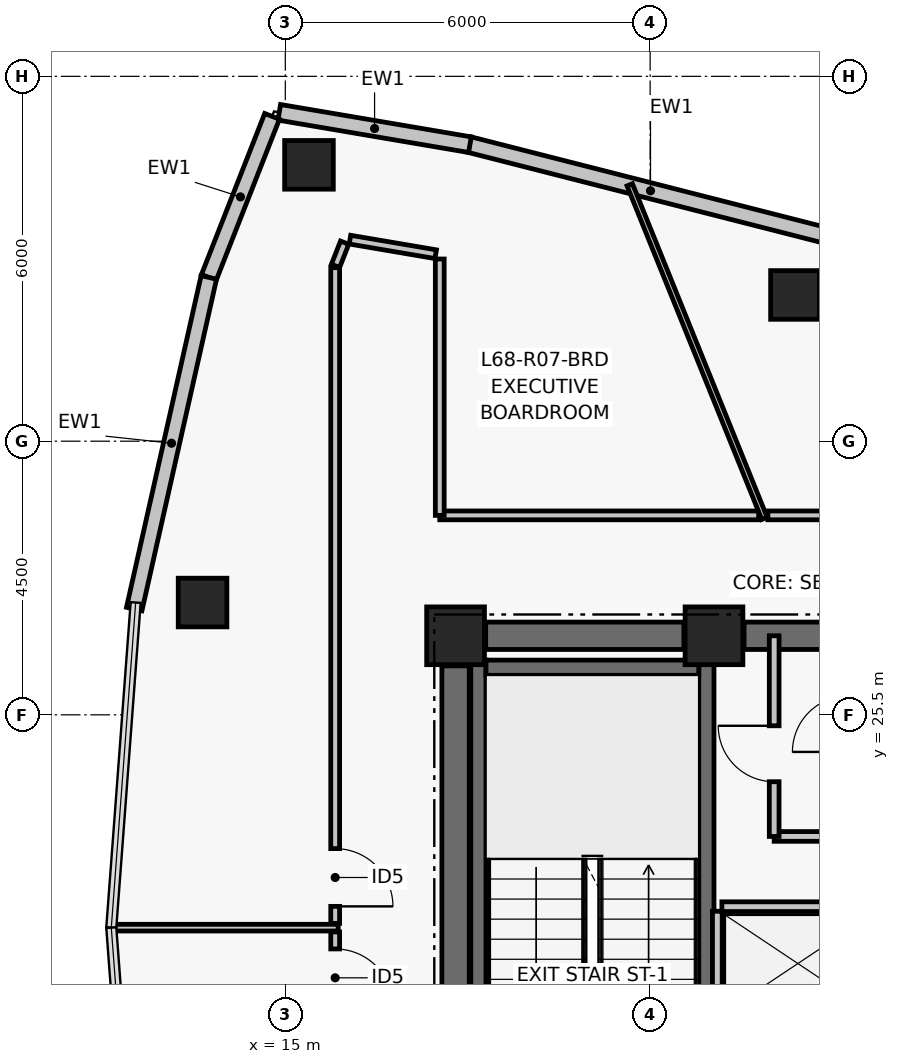
"""IFC4 building model, lengths in metres.
Left out: names, types, materials, properties, quantities, classifications, styles, units other than length and angle.
Written with IfcOpenShell. Run it as: python <this file> out.ifc"""

import sys

from ifc_helpers import new_model, si_unit, direction, frame, frame_2d, origin, origin_2d, place, context, subcontext, project, spatial, rectangle, hollow_rectangle, extrude, element, fill, save


model = new_model("IFC4")
c1 = context("Model", 3, precision=1e-05, world=origin(), true_north=direction((0.0, 1.0)))
c2 = subcontext(c1, "Body", "Model", "MODEL_VIEW")
j1 = project(units=[si_unit("LENGTHUNIT", "METRE"), si_unit("PLANEANGLEUNIT", "RADIAN")], contexts=[c1])
p1 = place(None, origin())
s1 = spatial("IfcSite", under=j1, at=p1, CompositionType="ELEMENT")
p2 = place(p1, origin())
s2 = spatial("IfcBuilding", under=s1, at=p2, CompositionType="ELEMENT")
p3 = place(p2, frame((0.0, 0.0, 269.46)))
s3 = spatial("IfcBuildingStorey", under=s2, at=p3, CompositionType="ELEMENT", Elevation=269.46)
for number, where, z_axis, x_axis in (
    (1, (17.8, 26.8, 0.0), (0.0, 0.0, 1.0), (1.0, 0.0, 0.0)),
    (2, (22.05, 26.8, 0.0), (0.0, 0.0, 1.0), (1.0, 0.0, 0.0)),
):
    element("IfcColumn", number, at=place(p3, frame(where, z_axis=z_axis, x_axis=x_axis)), inside=s3, PredefinedType="COLUMN", context=c2, shape_type="SweptSolid", body=[
        extrude(rectangle(XDim=0.95, YDim=0.95, at=origin_2d()), origin(), (0.0, 0.0, 1.0), 3.72),
    ])
p4 = place(p3, frame((18.295, 26.8, 0.0), z_axis=(0.0, 0.0, 1.0), x_axis=(1.0, 0.0, 0.0)))
e3 = element("IfcWall", 3, at=p4, inside=s3, PredefinedType="SHEAR", context=c2, shape_type="SweptSolid", body=[
    extrude(rectangle(XDim=3.26, YDim=0.45, at=frame_2d((1.63, 0.0))), origin(), (0.0, 0.0, 1.0), 3.5),
])
p5 = place(p3, frame((22.545, 26.8, 0.0), z_axis=(0.0, 0.0, 1.0), x_axis=(1.0, 0.0, 0.0)))
e4 = element("IfcWall", 4, at=p5, inside=s3, PredefinedType="SHEAR", context=c2, shape_type="SweptSolid", body=[
    extrude(rectangle(XDim=1.805, YDim=0.45, at=frame_2d((0.903, 0.0))), origin(), (0.0, 0.0, 1.0), 3.5),
])
p6 = place(p3, frame((17.8, 17.695, 0.0), z_axis=(0.0, 0.0, 1.0), x_axis=(0.0, 1.0, 0.0)))
e5 = element("IfcWall", 5, at=p6, inside=s3, PredefinedType="SHEAR", context=c2, shape_type="SweptSolid", body=[
    extrude(rectangle(XDim=8.61, YDim=0.45, at=frame_2d((4.305, 0.0))), origin(), (0.0, 0.0, 1.0), 3.5),
])
p7 = place(p3, frame((18.175, 17.6, 0.0), z_axis=(0.0, 0.0, 1.0), x_axis=(0.0, 1.0, 0.0)))
e6 = element("IfcWall", 6, at=p7, inside=s3, PredefinedType="SHEAR", context=c2, shape_type="SweptSolid", body=[
    extrude(rectangle(XDim=8.8, YDim=0.25, at=frame_2d((4.4, 0.0))), origin(), (0.0, 0.0, 1.0), 3.5),
])
p8 = place(p3, frame((21.925, 17.6, 0.0), z_axis=(0.0, 0.0, 1.0), x_axis=(0.0, 1.0, 0.0)))
e7 = element("IfcWall", 7, at=p8, inside=s3, PredefinedType="SHEAR", context=c2, shape_type="SweptSolid", body=[
    extrude(rectangle(XDim=8.8, YDim=0.25, at=frame_2d((4.4, 0.0))), origin(), (0.0, 0.0, 1.0), 3.5),
])
p9 = place(p8, frame((0.35, 0.0, 0.0)))
e8 = element("IfcOpeningElement", 8, at=p9, cuts=e7, PredefinedType="OPENING", context=c2, shape_type="SweptSolid", body=[
    extrude(rectangle(XDim=1.05, YDim=2.08, at=frame_2d((0.525, 1.04))), frame((0.0, 0.135, 0.0), z_axis=(0.0, -1.0, 0.0), x_axis=(1.0, 0.0, 0.0)), (0.0, 0.0, 1.0), 0.27),
])
p10 = place(p3, frame((18.3, 26.275, 0.0), z_axis=(0.0, 0.0, 1.0), x_axis=(1.0, 0.0, 0.0)))
e9 = element("IfcWall", 9, at=p10, inside=s3, PredefinedType="SHEAR", context=c2, shape_type="SweptSolid", body=[
    extrude(rectangle(XDim=3.5, YDim=0.25, at=frame_2d((1.75, 0.0))), origin(), (0.0, 0.0, 1.0), 3.5),
])
for number, where, z_axis, x_axis in (
    (10, (23.382, 32.405, 0.0), (0.0, 0.0, 1.0), (1.0, 0.0, 0.0)),
    (11, (15.389, 34.545, 0.0), (0.0, 0.0, 1.0), (1.0, 0.0, 0.0)),
    (12, (13.639, 27.347, 0.0), (0.0, 0.0, 1.0), (1.0, 0.0, 0.0)),
):
    element("IfcColumn", number, at=place(p3, frame(where, z_axis=z_axis, x_axis=x_axis)), inside=s3, PredefinedType="COLUMN", context=c2, shape_type="SweptSolid", body=[
        extrude(hollow_rectangle(XDim=0.8, YDim=0.8, WallThickness=0.035, at=origin_2d()), origin(), (0.0, 0.0, 1.0), 3.72),
    ])
p11 = place(p3, frame((18.024, 34.879, 0.0), z_axis=(0.0, 0.0, 1.0), x_axis=(0.968988278672, -0.247106689096, 0.0)))
e13 = element("IfcWall", 13, at=p11, inside=s3, PredefinedType="PARTITIONING", context=c2, shape_type="SweptSolid", body=[
    extrude(rectangle(XDim=6.154, YDim=0.26, at=frame_2d((3.077, 0.0))), origin(), (0.0, 0.0, 1.0), 3.5),
])
p12 = place(p3, frame((14.9, 35.409, 0.0), z_axis=(0.0, 0.0, 1.0), x_axis=(0.985889432766, -0.167397808709, 0.0)))
e14 = element("IfcWall", 14, at=p12, inside=s3, PredefinedType="PARTITIONING", context=c2, shape_type="SweptSolid", body=[
    extrude(rectangle(XDim=3.181, YDim=0.26, at=frame_2d((1.59, 0.0))), origin(), (0.0, 0.0, 1.0), 3.5),
])
p13 = place(p3, frame((13.742, 32.693, 0.0), z_axis=(0.0, 0.0, 1.0), x_axis=(0.36559927932, 0.930772349697, 0.0)))
e15 = element("IfcWall", 15, at=p13, inside=s3, PredefinedType="PARTITIONING", context=c2, shape_type="SweptSolid", body=[
    extrude(rectangle(XDim=2.845, YDim=0.26, at=frame_2d((1.423, 0.0))), origin(), (0.0, 0.0, 1.0), 3.5),
])
p14 = place(p3, frame((12.515, 27.24, 0.0), z_axis=(0.0, 0.0, 1.0), x_axis=(0.219500763731, 0.97561232809, 0.0)))
e16 = element("IfcWall", 16, at=p14, inside=s3, PredefinedType="PARTITIONING", context=c2, shape_type="SweptSolid", body=[
    extrude(rectangle(XDim=5.59, YDim=0.26, at=frame_2d((2.795, 0.0))), origin(), (0.0, 0.0, 1.0), 3.5),
])
p15 = place(p3, frame((22.105, 20.56, 0.0), z_axis=(0.0, 0.0, 1.0), x_axis=(0.0, 1.0, 0.0)))
e17 = element("IfcWall", 17, at=p15, inside=s3, PredefinedType="PARTITIONING", context=c2, shape_type="SweptSolid", body=[
    extrude(rectangle(XDim=1.71, YDim=0.16, at=frame_2d((0.855, 0.0))), origin(), (0.0, 0.0, 1.0), 3.5),
])
p16 = place(p3, frame((22.18, 22.345, 0.0), z_axis=(0.0, 0.0, 1.0), x_axis=(1.0, 0.0, 0.0)))
e18 = element("IfcWall", 18, at=p16, inside=s3, PredefinedType="PARTITIONING", context=c2, shape_type="SweptSolid", body=[
    extrude(rectangle(XDim=2.65, YDim=0.16, at=frame_2d((1.325, 0.0))), origin(), (0.0, 0.0, 1.0), 3.5),
])
p17 = place(p3, frame((23.04, 23.5, 0.0), z_axis=(0.0, 0.0, 1.0), x_axis=(1.0, 0.0, 0.0)))
e19 = element("IfcWall", 19, at=p17, inside=s3, PredefinedType="PARTITIONING", context=c2, shape_type="SweptSolid", body=[
    extrude(rectangle(XDim=1.7, YDim=0.16, at=frame_2d((0.85, 0.0))), origin(), (0.0, 0.0, 1.0), 3.5),
])
p18 = place(p3, frame((23.04, 23.5, 0.0), z_axis=(0.0, 0.0, 1.0), x_axis=(0.0, 1.0, 0.0)))
e20 = element("IfcWall", 20, at=p18, inside=s3, PredefinedType="PARTITIONING", context=c2, shape_type="SweptSolid", body=[
    extrude(rectangle(XDim=3.3, YDim=0.16, at=frame_2d((1.65, 0.0))), origin(), (0.0, 0.0, 1.0), 2.63),
])
p19 = place(p18, frame((0.9, 0.0, 0.0)))
e21 = element("IfcOpeningElement", 21, at=p19, cuts=e20, PredefinedType="OPENING", context=c2, shape_type="SweptSolid", body=[
    extrude(rectangle(XDim=0.92, YDim=2.05, at=frame_2d((0.46, 1.025))), frame((0.0, 0.09, 0.0), z_axis=(0.0, -1.0, 0.0), x_axis=(1.0, 0.0, 0.0)), (0.0, 0.0, 1.0), 0.18),
])
p20 = place(p3, frame((15.82, 21.93, 0.0), z_axis=(0.0, 0.0, 1.0), x_axis=(0.0, -1.0, 0.0)))
e22 = element("IfcWall", 22, at=p20, inside=s3, PredefinedType="PARTITIONING", context=c2, shape_type="SweptSolid", body=[
    extrude(rectangle(XDim=6.951, YDim=0.145, at=frame_2d((3.475, 0.0))), origin(), (0.0, 0.0, 1.0), 2.78),
])
p21 = place(p20, frame((0.28, 0.0, 0.0)))
e23 = element("IfcOpeningElement", 23, at=p21, cuts=e22, PredefinedType="OPENING", context=c2, shape_type="SweptSolid", body=[
    extrude(rectangle(XDim=0.95, YDim=2.06, at=frame_2d((0.475, 1.03))), frame((0.0, 0.083, 0.0), z_axis=(0.0, -1.0, 0.0), x_axis=(1.0, 0.0, 0.0)), (0.0, 0.0, 1.0), 0.165),
])
p22 = place(p3, frame((28.5, 28.78, 0.0), z_axis=(0.0, 0.0, 1.0), x_axis=(-1.0, 0.0, 0.0)))
e24 = element("IfcWall", 24, at=p22, inside=s3, PredefinedType="PARTITIONING", context=c2, shape_type="SweptSolid", body=[
    extrude(rectangle(XDim=5.564, YDim=0.145, at=frame_2d((2.782, 0.0))), origin(), (0.0, 0.0, 1.0), 3.5),
])
p23 = place(p22, frame((2.322, 0.0, 0.0)))
e25 = element("IfcOpeningElement", 25, at=p23, cuts=e24, PredefinedType="OPENING", context=c2, shape_type="SweptSolid", body=[
    extrude(rectangle(XDim=0.92, YDim=2.05, at=frame_2d((0.46, 1.025))), frame((0.0, 0.083, 0.0), z_axis=(0.0, -1.0, 0.0), x_axis=(1.0, 0.0, 0.0)), (0.0, 0.0, 1.0), 0.165),
])
p24 = place(p3, frame((22.785, 28.78, 0.0), z_axis=(0.0, 0.0, 1.0), x_axis=(-1.0, 0.0, 0.0)))
e26 = element("IfcWall", 26, at=p24, inside=s3, PredefinedType="PARTITIONING", context=c2, shape_type="SweptSolid", body=[
    extrude(rectangle(XDim=5.245, YDim=0.145, at=frame_2d((2.623, 0.0))), origin(), (0.0, 0.0, 1.0), 2.78),
])
p25 = place(p3, frame((17.54, 28.78, 0.0), z_axis=(0.0, 0.0, 1.0), x_axis=(0.0, 1.0, 0.0)))
e27 = element("IfcWall", 27, at=p25, inside=s3, PredefinedType="PARTITIONING", context=c2, shape_type="SweptSolid", body=[
    extrude(rectangle(XDim=4.216, YDim=0.145, at=frame_2d((2.108, 0.0))), origin(), (0.0, 0.0, 1.0), 3.13),
])
p26 = place(p3, frame((17.473, 33.075, 0.0), z_axis=(0.0, 0.0, 1.0), x_axis=(-0.985881780308, 0.167442871621, 0.0)))
e28 = element("IfcWall", 28, at=p26, inside=s3, PredefinedType="PARTITIONING", context=c2, shape_type="SweptSolid", body=[
    extrude(rectangle(XDim=1.43, YDim=0.145, at=frame_2d((0.715, 0.0))), origin(), (0.0, 0.0, 1.0), 3.13),
])
p27 = place(p3, frame((15.975, 33.265, 0.0), z_axis=(0.0, 0.0, 1.0), x_axis=(-0.365633948196, -0.930758731319, 0.0)))
e29 = element("IfcWall", 29, at=p27, inside=s3, PredefinedType="PARTITIONING", context=c2, shape_type="SweptSolid", body=[
    extrude(rectangle(XDim=0.41, YDim=0.145, at=frame_2d((0.205, 0.0))), origin(), (0.0, 0.0, 1.0), 2.78),
])
p28 = place(p3, frame((15.82, 32.854, 0.0), z_axis=(0.0, 0.0, 1.0), x_axis=(0.0, -1.0, 0.0)))
e30 = element("IfcWall", 30, at=p28, inside=s3, PredefinedType="PARTITIONING", context=c2, shape_type="SweptSolid", body=[
    extrude(rectangle(XDim=10.784, YDim=0.145, at=frame_2d((5.392, 0.0))), origin(), (0.0, 0.0, 1.0), 2.78),
])
p29 = place(p28, frame((9.554, 0.0, 0.0)))
e31 = element("IfcOpeningElement", 31, at=p29, cuts=e30, PredefinedType="OPENING", context=c2, shape_type="SweptSolid", body=[
    extrude(rectangle(XDim=0.95, YDim=2.06, at=frame_2d((0.475, 1.03))), frame((0.0, 0.083, 0.0), z_axis=(0.0, -1.0, 0.0), x_axis=(1.0, 0.0, 0.0)), (0.0, 0.0, 1.0), 0.165),
])
p30 = place(p3, frame((22.881, 28.73, 0.0), z_axis=(0.0, 0.0, 1.0), x_axis=(-0.374589946081, 0.927190580353, 0.0)))
e32 = element("IfcWall", 32, at=p30, inside=s3, PredefinedType="PARTITIONING", context=c2, shape_type="SweptSolid", body=[
    extrude(rectangle(XDim=5.917, YDim=0.095, at=frame_2d((2.958, 0.0))), origin(), (0.0, 0.0, 1.0), 2.78),
])
p31 = place(p3, frame((15.87, 22.0, 0.0), z_axis=(0.0, 0.0, 1.0), x_axis=(-1.0, 0.0, 0.0)))
e33 = element("IfcWall", 33, at=p31, inside=s3, PredefinedType="PARTITIONING", context=c2, shape_type="SweptSolid", body=[
    extrude(rectangle(XDim=3.742, YDim=0.11, at=frame_2d((1.871, 0.0))), origin(), (0.0, 0.0, 1.0), 2.98),
])
p32 = place(p19, origin())
e34 = element("IfcDoor", 34, at=p32, inside=s3, OperationType="SINGLE_SWING_RIGHT", PredefinedType="DOOR", context=c2, shape_type="SweptSolid", body=[
    extrude(rectangle(XDim=0.92, YDim=2.05, at=frame_2d((0.46, 1.025))), frame((0.0, 0.025, 0.0), z_axis=(0.0, -1.0, 0.0), x_axis=(1.0, 0.0, 0.0)), (0.0, 0.0, 1.0), 0.05),
])
fill(e21, e34)
p33 = place(p21, origin())
e35 = element("IfcDoor", 35, at=p33, inside=s3, OperationType="SINGLE_SWING_RIGHT", PredefinedType="DOOR", context=c2, shape_type="SweptSolid", body=[
    extrude(rectangle(XDim=0.95, YDim=2.06, at=frame_2d((0.475, 1.03))), frame((0.0, 0.025, 0.0), z_axis=(0.0, -1.0, 0.0), x_axis=(1.0, 0.0, 0.0)), (0.0, 0.0, 1.0), 0.05),
])
fill(e23, e35)
p34 = place(p29, origin())
e36 = element("IfcDoor", 36, at=p34, inside=s3, OperationType="SINGLE_SWING_RIGHT", PredefinedType="DOOR", context=c2, shape_type="SweptSolid", body=[
    extrude(rectangle(XDim=0.95, YDim=2.06, at=frame_2d((0.475, 1.03))), frame((0.0, 0.025, 0.0), z_axis=(0.0, -1.0, 0.0), x_axis=(1.0, 0.0, 0.0)), (0.0, 0.0, 1.0), 0.05),
])
fill(e31, e36)
save(model, sys.argv[1])
